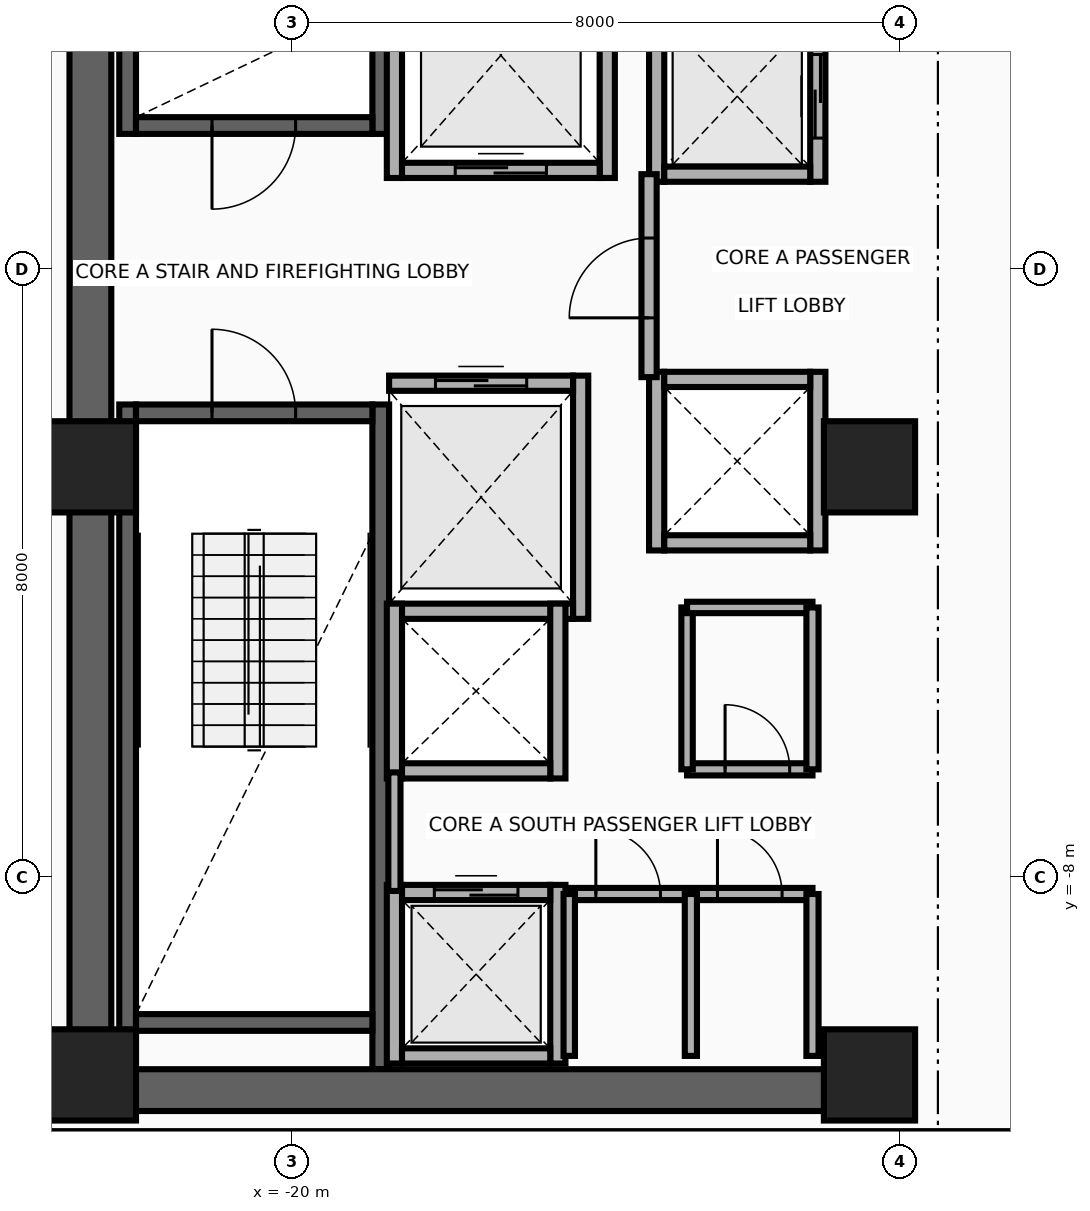
"""IFC4 building model, lengths in metres.
Left out: names, types, materials, properties, quantities, classifications, styles, units other than length and angle.
Written with IfcOpenShell. Run it as: python <this file> out.ifc"""

import sys

from ifc_helpers import new_model, si_unit, direction, frame, frame_2d, origin, origin_2d, place, context, subcontext, project, spatial, rectangle, extrude, source, transform, mapped, element, fill, save


model = new_model("IFC4")
c1 = context("Model", 3, precision=1e-05, world=origin(), true_north=direction((0.0, 1.0)))
c2 = subcontext(c1, "Body", "Model", "MODEL_VIEW")
j1 = project(units=[si_unit("LENGTHUNIT", "METRE"), si_unit("PLANEANGLEUNIT", "RADIAN")], contexts=[c1])
p1 = place(None, origin())
s1 = spatial("IfcSite", under=j1, at=p1, CompositionType="ELEMENT")
p2 = place(p1, origin())
s2 = spatial("IfcBuilding", under=s1, at=p2, CompositionType="ELEMENT")
p3 = place(p2, frame((0.0, 0.0, 153.8)))
s3 = spatial("IfcBuildingStorey", under=s2, at=p3, CompositionType="ELEMENT", Elevation=153.8)
for number, where, z_axis, x_axis in (
    (1, (-22.16, 1.78, 0.0), (0.0, 0.0, 1.0), (0.0, 1.0, 0.0)),
    (2, (-18.83, 1.78, 0.0), (0.0, 0.0, 1.0), (0.0, 1.0, 0.0)),
):
    element("IfcWall", number, at=place(p3, frame(where, z_axis=z_axis, x_axis=x_axis)), inside=s3, PredefinedType="SHEAR", context=c2, shape_type="SweptSolid", body=[
        extrude(rectangle(XDim=8.745, YDim=0.22, at=frame_2d((4.373, 0.0))), origin(), (0.0, 0.0, 1.0), 3.46),
    ])
p4 = place(p3, frame((-22.05, 1.89, 0.0), z_axis=(0.0, 0.0, 1.0), x_axis=(1.0, 0.0, 0.0)))
e3 = element("IfcWall", 3, at=p4, inside=s3, PredefinedType="SHEAR", context=c2, shape_type="SweptSolid", body=[
    extrude(rectangle(XDim=3.11, YDim=0.22, at=frame_2d((1.555, 0.0))), origin(), (0.0, 0.0, 1.0), 3.46),
])
p5 = place(p4, frame((1.0, 0.0, 0.0)))
e4 = element("IfcOpeningElement", 4, at=p5, cuts=e3, PredefinedType="OPENING", context=c2, shape_type="SweptSolid", body=[
    extrude(rectangle(XDim=1.1, YDim=2.15, at=frame_2d((0.55, 1.075))), frame((0.0, 0.125, 0.0), z_axis=(0.0, -1.0, 0.0), x_axis=(1.0, 0.0, 0.0)), (0.0, 0.0, 1.0), 0.25),
])
for number, where, z_axis, x_axis in (
    (5, (-22.16, -10.525, 0.0), (0.0, 0.0, 1.0), (0.0, 1.0, 0.0)),
    (6, (-18.83, -10.525, 0.0), (0.0, 0.0, 1.0), (0.0, 1.0, 0.0)),
):
    element("IfcWall", number, at=place(p3, frame(where, z_axis=z_axis, x_axis=x_axis)), inside=s3, PredefinedType="SHEAR", context=c2, shape_type="SweptSolid", body=[
        extrude(rectangle(XDim=8.745, YDim=0.22, at=frame_2d((4.373, 0.0))), origin(), (0.0, 0.0, 1.0), 3.46),
    ])
p6 = place(p3, frame((-22.05, -9.91, 0.0), z_axis=(0.0, 0.0, 1.0), x_axis=(1.0, 0.0, 0.0)))
e7 = element("IfcWall", 7, at=p6, inside=s3, PredefinedType="SHEAR", context=c2, shape_type="SweptSolid", body=[
    extrude(rectangle(XDim=3.11, YDim=0.22, at=frame_2d((1.555, 0.0))), origin(), (0.0, 0.0, 1.0), 3.46),
])
p7 = place(p3, frame((-22.05, -1.89, 0.0), z_axis=(0.0, 0.0, 1.0), x_axis=(1.0, 0.0, 0.0)))
e8 = element("IfcWall", 8, at=p7, inside=s3, PredefinedType="SHEAR", context=c2, shape_type="SweptSolid", body=[
    extrude(rectangle(XDim=3.11, YDim=0.22, at=frame_2d((1.555, 0.0))), origin(), (0.0, 0.0, 1.0), 3.46),
])
p8 = place(p7, frame((1.0, 0.0, 0.0)))
e9 = element("IfcOpeningElement", 9, at=p8, cuts=e8, PredefinedType="OPENING", context=c2, shape_type="SweptSolid", body=[
    extrude(rectangle(XDim=1.1, YDim=2.15, at=frame_2d((0.55, 1.075))), frame((0.0, 0.125, 0.0), z_axis=(0.0, -1.0, 0.0), x_axis=(1.0, 0.0, 0.0)), (0.0, 0.0, 1.0), 0.25),
])
p9 = place(p3, frame((-22.65, -11.075, 0.0), z_axis=(0.0, 0.0, 1.0), x_axis=(0.0, 1.0, 0.0)))
e10 = element("IfcWall", 10, at=p9, inside=s3, PredefinedType="SHEAR", context=c2, shape_type="SweptSolid", body=[
    extrude(rectangle(XDim=22.15, YDim=0.55, at=frame_2d((11.075, 0.0))), origin(), (0.0, 0.0, 1.0), 3.46),
])
p10 = place(p3, frame((-22.65, -10.8, 0.0), z_axis=(0.0, 0.0, 1.0), x_axis=(1.0, 0.0, 0.0)))
e11 = element("IfcWall", 11, at=p10, inside=s3, PredefinedType="SHEAR", context=c2, shape_type="SweptSolid", body=[
    extrude(rectangle(XDim=10.25, YDim=0.55, at=frame_2d((5.125, 0.0))), origin(), (0.0, 0.0, 1.0), 3.46),
])
m1 = source(origin(), c2, "Body", "SweptSolid", [
    extrude(rectangle(XDim=1.2, YDim=1.2, at=origin_2d()), origin(), (0.0, 0.0, 1.0), 3.7),
])
for number, where, z_axis, x_axis in (
    (12, (-22.65, -10.6, 0.0), (0.0, 0.0, 1.0), (1.0, 0.0, 0.0)),
    (13, (-12.4, -10.6, 0.0), (0.0, 0.0, 1.0), (1.0, 0.0, 0.0)),
    (14, (-22.65, -2.6, 0.0), (0.0, 0.0, 1.0), (1.0, 0.0, 0.0)),
    (15, (-12.4, -2.6, 0.0), (0.0, 0.0, 1.0), (1.0, 0.0, 0.0)),
):
    element("IfcColumn", number, at=place(p3, frame(where, z_axis=z_axis, x_axis=x_axis)), inside=s3, PredefinedType="COLUMN", context=c2, shape_type="MappedRepresentation", body=[
        mapped(m1, transform((0.0, 0.0, 0.0), x_axis=(1.0, 0.0, 0.0), y_axis=(0.0, 1.0, 0.0), z_axis=(0.0, 0.0, 1.0), scale=1.0)),
    ])
for number, where, z_axis, x_axis in (
    (16, (-18.65, 1.2, 0.0), (0.0, 0.0, 1.0), (0.0, 1.0, 0.0)),
    (17, (-15.85, 1.2, 0.0), (0.0, 0.0, 1.0), (0.0, 1.0, 0.0)),
):
    element("IfcWall", number, at=place(p3, frame(where, z_axis=z_axis, x_axis=x_axis)), inside=s3, PredefinedType="MOVABLE", context=c2, shape_type="SweptSolid", body=[
        extrude(rectangle(XDim=3.225, YDim=0.2, at=frame_2d((1.613, 0.0))), origin(), (0.0, 0.0, 1.0), 3.46),
    ])
p11 = place(p3, frame((-18.55, 1.3, 0.0), z_axis=(0.0, 0.0, 1.0), x_axis=(1.0, 0.0, 0.0)))
e18 = element("IfcWall", 18, at=p11, inside=s3, PredefinedType="MOVABLE", context=c2, shape_type="SweptSolid", body=[
    extrude(rectangle(XDim=2.6, YDim=0.2, at=frame_2d((1.3, 0.0))), origin(), (0.0, 0.0, 1.0), 3.46),
])
p12 = place(p11, frame((0.7, 0.0, 0.0)))
e19 = element("IfcOpeningElement", 19, at=p12, cuts=e18, PredefinedType="OPENING", context=c2, shape_type="SweptSolid", body=[
    extrude(rectangle(XDim=1.2, YDim=2.1, at=frame_2d((0.6, 1.05))), frame((0.0, 0.115, 0.0), z_axis=(0.0, -1.0, 0.0), x_axis=(1.0, 0.0, 0.0)), (0.0, 0.0, 1.0), 0.23),
])
p13 = place(p3, frame((-16.2, -4.6, 0.0), z_axis=(0.0, 0.0, 1.0), x_axis=(0.0, 1.0, 0.0)))
e20 = element("IfcWall", 20, at=p13, inside=s3, PredefinedType="MOVABLE", context=c2, shape_type="SweptSolid", body=[
    extrude(rectangle(XDim=3.2, YDim=0.2, at=frame_2d((1.6, 0.0))), origin(), (0.0, 0.0, 1.0), 3.46),
])
p14 = place(p3, frame((-18.72, -4.5, 0.0), z_axis=(0.0, 0.0, 1.0), x_axis=(1.0, 0.0, 0.0)))
e21 = element("IfcWall", 21, at=p14, inside=s3, PredefinedType="MOVABLE", context=c2, shape_type="SweptSolid", body=[
    extrude(rectangle(XDim=2.42, YDim=0.2, at=frame_2d((1.21, 0.0))), origin(), (0.0, 0.0, 1.0), 3.46),
])
p15 = place(p3, frame((-18.72, -1.5, 0.0), z_axis=(0.0, 0.0, 1.0), x_axis=(1.0, 0.0, 0.0)))
e22 = element("IfcWall", 22, at=p15, inside=s3, PredefinedType="MOVABLE", context=c2, shape_type="SweptSolid", body=[
    extrude(rectangle(XDim=2.42, YDim=0.2, at=frame_2d((1.21, 0.0))), origin(), (0.0, 0.0, 1.0), 3.46),
])
p16 = place(p15, frame((0.61, 0.0, 0.0)))
e23 = element("IfcOpeningElement", 23, at=p16, cuts=e22, PredefinedType="OPENING", context=c2, shape_type="SweptSolid", body=[
    extrude(rectangle(XDim=1.2, YDim=2.1, at=frame_2d((0.6, 1.05))), frame((0.0, 0.115, 0.0), z_axis=(0.0, -1.0, 0.0), x_axis=(1.0, 0.0, 0.0)), (0.0, 0.0, 1.0), 0.23),
])
for number, where, z_axis, x_axis in (
    (24, (-18.65, -10.45, 0.0), (0.0, 0.0, 1.0), (0.0, 1.0, 0.0)),
    (25, (-16.5, -10.45, 0.0), (0.0, 0.0, 1.0), (0.0, 1.0, 0.0)),
):
    element("IfcWall", number, at=place(p3, frame(where, z_axis=z_axis, x_axis=x_axis)), inside=s3, PredefinedType="MOVABLE", context=c2, shape_type="SweptSolid", body=[
        extrude(rectangle(XDim=2.35, YDim=0.2, at=frame_2d((1.175, 0.0))), origin(), (0.0, 0.0, 1.0), 2.666),
    ])
p17 = place(p3, frame((-18.55, -10.35, 0.0), z_axis=(0.0, 0.0, 1.0), x_axis=(1.0, 0.0, 0.0)))
e26 = element("IfcWall", 26, at=p17, inside=s3, PredefinedType="MOVABLE", context=c2, shape_type="SweptSolid", body=[
    extrude(rectangle(XDim=1.95, YDim=0.2, at=frame_2d((0.975, 0.0))), origin(), (0.0, 0.0, 1.0), 2.666),
])
p18 = place(p3, frame((-18.55, -8.2, 0.0), z_axis=(0.0, 0.0, 1.0), x_axis=(1.0, 0.0, 0.0)))
e27 = element("IfcWall", 27, at=p18, inside=s3, PredefinedType="MOVABLE", context=c2, shape_type="SweptSolid", body=[
    extrude(rectangle(XDim=1.95, YDim=0.2, at=frame_2d((0.975, 0.0))), origin(), (0.0, 0.0, 1.0), 3.46),
])
p19 = place(p18, frame((0.425, 0.0, 0.0)))
e28 = element("IfcOpeningElement", 28, at=p19, cuts=e27, PredefinedType="OPENING", context=c2, shape_type="SweptSolid", body=[
    extrude(rectangle(XDim=1.1, YDim=2.1, at=frame_2d((0.55, 1.05))), frame((0.0, 0.115, 0.0), z_axis=(0.0, -1.0, 0.0), x_axis=(1.0, 0.0, 0.0)), (0.0, 0.0, 1.0), 0.23),
])
p20 = place(p3, frame((-15.2, 1.15, 0.0), z_axis=(0.0, 0.0, 1.0), x_axis=(0.0, 1.0, 0.0)))
e29 = element("IfcWall", 29, at=p20, inside=s3, PredefinedType="MOVABLE", context=c2, shape_type="SweptSolid", body=[
    extrude(rectangle(XDim=2.25, YDim=0.2, at=frame_2d((1.125, 0.0))), origin(), (0.0, 0.0, 1.0), 3.46),
])
p21 = place(p3, frame((-13.08, 1.15, 0.0), z_axis=(0.0, 0.0, 1.0), x_axis=(0.0, 1.0, 0.0)))
e30 = element("IfcWall", 30, at=p21, inside=s3, PredefinedType="MOVABLE", context=c2, shape_type="SweptSolid", body=[
    extrude(rectangle(XDim=2.25, YDim=0.2, at=frame_2d((1.125, 0.0))), origin(), (0.0, 0.0, 1.0), 3.46),
])
p22 = place(p21, frame((0.575, 0.0, 0.0)))
e31 = element("IfcOpeningElement", 31, at=p22, cuts=e30, PredefinedType="OPENING", context=c2, shape_type="SweptSolid", body=[
    extrude(rectangle(XDim=1.1, YDim=2.1, at=frame_2d((0.55, 1.05))), frame((0.0, 0.115, 0.0), z_axis=(0.0, -1.0, 0.0), x_axis=(1.0, 0.0, 0.0)), (0.0, 0.0, 1.0), 0.23),
])
p23 = place(p3, frame((-15.1, 1.25, 0.0), z_axis=(0.0, 0.0, 1.0), x_axis=(1.0, 0.0, 0.0)))
e32 = element("IfcWall", 32, at=p23, inside=s3, PredefinedType="MOVABLE", context=c2, shape_type="SweptSolid", body=[
    extrude(rectangle(XDim=1.92, YDim=0.2, at=frame_2d((0.96, 0.0))), origin(), (0.0, 0.0, 1.0), 3.46),
])
for number, where, z_axis, x_axis in (
    (33, (-18.65, -6.7, 0.0), (0.0, 0.0, 1.0), (0.0, 1.0, 0.0)),
    (34, (-16.5, -6.7, 0.0), (0.0, 0.0, 1.0), (0.0, 1.0, 0.0)),
):
    element("IfcWall", number, at=place(p3, frame(where, z_axis=z_axis, x_axis=x_axis)), inside=s3, PredefinedType="MOVABLE", context=c2, shape_type="SweptSolid", body=[
        extrude(rectangle(XDim=2.3, YDim=0.2, at=frame_2d((1.15, 0.0))), origin(), (0.0, 0.0, 1.0), 3.46),
    ])
p24 = place(p3, frame((-18.55, -6.6, 0.0), z_axis=(0.0, 0.0, 1.0), x_axis=(1.0, 0.0, 0.0)))
e35 = element("IfcWall", 35, at=p24, inside=s3, PredefinedType="MOVABLE", context=c2, shape_type="SweptSolid", body=[
    extrude(rectangle(XDim=1.95, YDim=0.2, at=frame_2d((0.975, 0.0))), origin(), (0.0, 0.0, 1.0), 3.46),
])
for number, where, z_axis, x_axis in (
    (36, (-15.2, -3.7, 0.0), (0.0, 0.0, 1.0), (0.0, 1.0, 0.0)),
    (37, (-13.08, -3.7, 0.0), (0.0, 0.0, 1.0), (0.0, 1.0, 0.0)),
):
    element("IfcWall", number, at=place(p3, frame(where, z_axis=z_axis, x_axis=x_axis)), inside=s3, PredefinedType="MOVABLE", context=c2, shape_type="SweptSolid", body=[
        extrude(rectangle(XDim=2.35, YDim=0.2, at=frame_2d((1.175, 0.0))), origin(), (0.0, 0.0, 1.0), 3.46),
    ])
for number, where, z_axis, x_axis in (
    (38, (-15.1, -3.6, 0.0), (0.0, 0.0, 1.0), (1.0, 0.0, 0.0)),
    (39, (-15.1, -1.45, 0.0), (0.0, 0.0, 1.0), (1.0, 0.0, 0.0)),
):
    element("IfcWall", number, at=place(p3, frame(where, z_axis=z_axis, x_axis=x_axis)), inside=s3, PredefinedType="MOVABLE", context=c2, shape_type="SweptSolid", body=[
        extrude(rectangle(XDim=1.92, YDim=0.2, at=frame_2d((0.96, 0.0))), origin(), (0.0, 0.0, 1.0), 3.46),
    ])
p25 = place(p3, frame((-15.3, -1.42, 0.0), z_axis=(0.0, 0.0, 1.0), x_axis=(0.0, 1.0, 0.0)))
e40 = element("IfcWall", 40, at=p25, inside=s3, PredefinedType="PARTITIONING", context=c2, shape_type="SweptSolid", body=[
    extrude(rectangle(XDim=2.67, YDim=0.2, at=frame_2d((1.335, 0.0))), origin(), (0.0, 0.0, 1.0), 3.46),
])
p26 = place(p25, frame((0.78, 0.0, 0.0)))
e41 = element("IfcOpeningElement", 41, at=p26, cuts=e40, PredefinedType="OPENING", context=c2, shape_type="SweptSolid", body=[
    extrude(rectangle(XDim=1.05, YDim=2.15, at=frame_2d((0.525, 1.075))), frame((0.0, 0.115, 0.0), z_axis=(0.0, -1.0, 0.0), x_axis=(1.0, 0.0, 0.0)), (0.0, 0.0, 1.0), 0.23),
])
p27 = place(p3, frame((-18.65, -8.18, 0.0), z_axis=(0.0, 0.0, 1.0), x_axis=(0.0, 1.0, 0.0)))
e42 = element("IfcWall", 42, at=p27, inside=s3, PredefinedType="PARTITIONING", context=c2, shape_type="SweptSolid", body=[
    extrude(rectangle(XDim=1.56, YDim=0.16, at=frame_2d((0.78, 0.0))), origin(), (0.0, 0.0, 1.0), 3.46),
])
p28 = place(p3, frame((-16.35, -8.22, 0.0), z_axis=(0.0, 0.0, 1.0), x_axis=(1.0, 0.0, 0.0)))
e43 = element("IfcWall", 43, at=p28, inside=s3, PredefinedType="PARTITIONING", context=c2, shape_type="SweptSolid", body=[
    extrude(rectangle(XDim=3.2, YDim=0.16, at=frame_2d((1.6, 0.0))), origin(), (0.0, 0.0, 1.0), 3.46),
])
p29 = place(p28, frame((0.35, 0.0, 0.0)))
e44 = element("IfcOpeningElement", 44, at=p29, cuts=e43, PredefinedType="OPENING", context=c2, shape_type="SweptSolid", body=[
    extrude(rectangle(XDim=0.85, YDim=2.05, at=frame_2d((0.425, 1.025))), frame((0.0, 0.095, 0.0), z_axis=(0.0, -1.0, 0.0), x_axis=(1.0, 0.0, 0.0)), (0.0, 0.0, 1.0), 0.19),
])
p30 = place(p28, frame((1.95, 0.0, 0.0)))
e45 = element("IfcOpeningElement", 45, at=p30, cuts=e43, PredefinedType="OPENING", context=c2, shape_type="SweptSolid", body=[
    extrude(rectangle(XDim=0.85, YDim=2.05, at=frame_2d((0.425, 1.025))), frame((0.0, 0.095, 0.0), z_axis=(0.0, -1.0, 0.0), x_axis=(1.0, 0.0, 0.0)), (0.0, 0.0, 1.0), 0.19),
])
p31 = place(p3, frame((-16.35, -10.35, 0.0), z_axis=(0.0, 0.0, 1.0), x_axis=(0.0, 1.0, 0.0)))
e46 = element("IfcWall", 46, at=p31, inside=s3, PredefinedType="PARTITIONING", context=c2, shape_type="SweptSolid", body=[
    extrude(rectangle(XDim=2.13, YDim=0.15, at=frame_2d((1.065, 0.0))), origin(), (0.0, 0.0, 1.0), 3.46),
])
for number, where, z_axis, x_axis in (
    (47, (-13.15, -10.35, 0.0), (0.0, 0.0, 1.0), (0.0, 1.0, 0.0)),
    (48, (-14.75, -10.35, 0.0), (0.0, 0.0, 1.0), (0.0, 1.0, 0.0)),
):
    element("IfcWall", number, at=place(p3, frame(where, z_axis=z_axis, x_axis=x_axis)), inside=s3, PredefinedType="PARTITIONING", context=c2, shape_type="SweptSolid", body=[
        extrude(rectangle(XDim=2.13, YDim=0.16, at=frame_2d((1.065, 0.0))), origin(), (0.0, 0.0, 1.0), 3.46),
    ])
p32 = place(p3, frame((-14.8, -6.58, 0.0), z_axis=(0.0, 0.0, 1.0), x_axis=(1.0, 0.0, 0.0)))
e49 = element("IfcWall", 49, at=p32, inside=s3, PredefinedType="PARTITIONING", context=c2, shape_type="SweptSolid", body=[
    extrude(rectangle(XDim=1.65, YDim=0.16, at=frame_2d((0.825, 0.0))), origin(), (0.0, 0.0, 1.0), 3.46),
])
p33 = place(p32, frame((0.5, 0.0, 0.0)))
e50 = element("IfcOpeningElement", 50, at=p33, cuts=e49, PredefinedType="OPENING", context=c2, shape_type="SweptSolid", body=[
    extrude(rectangle(XDim=0.85, YDim=2.05, at=frame_2d((0.425, 1.025))), frame((0.0, 0.095, 0.0), z_axis=(0.0, -1.0, 0.0), x_axis=(1.0, 0.0, 0.0)), (0.0, 0.0, 1.0), 0.19),
])
p34 = place(p3, frame((-14.8, -6.58, 0.0), z_axis=(0.0, 0.0, 1.0), x_axis=(0.0, 1.0, 0.0)))
e51 = element("IfcWall", 51, at=p34, inside=s3, PredefinedType="PARTITIONING", context=c2, shape_type="SweptSolid", body=[
    extrude(rectangle(XDim=2.13, YDim=0.15, at=frame_2d((1.065, 0.0))), origin(), (0.0, 0.0, 1.0), 3.46),
])
p35 = place(p3, frame((-14.8, -4.45, 0.0), z_axis=(0.0, 0.0, 1.0), x_axis=(1.0, 0.0, 0.0)))
e52 = element("IfcWall", 52, at=p35, inside=s3, PredefinedType="PARTITIONING", context=c2, shape_type="SweptSolid", body=[
    extrude(rectangle(XDim=1.65, YDim=0.15, at=frame_2d((0.825, 0.0))), origin(), (0.0, 0.0, 1.0), 3.46),
])
p36 = place(p3, frame((-13.15, -6.58, 0.0), z_axis=(0.0, 0.0, 1.0), x_axis=(0.0, 1.0, 0.0)))
e53 = element("IfcWall", 53, at=p36, inside=s3, PredefinedType="PARTITIONING", context=c2, shape_type="SweptSolid", body=[
    extrude(rectangle(XDim=2.13, YDim=0.16, at=frame_2d((1.065, 0.0))), origin(), (0.0, 0.0, 1.0), 3.46),
])
p37 = place(p3, frame((-23.45, -11.42, 0.0), z_axis=(0.0, 0.0, 1.0), x_axis=(1.0, 0.0, 0.0)))
e54 = element("IfcWall", 54, at=p37, inside=s3, PredefinedType="PARTITIONING", context=c2, shape_type="SweptSolid", body=[
    extrude(rectangle(XDim=13.84, YDim=0.16, at=frame_2d((6.92, 0.0))), origin(), (0.0, 0.0, 1.0), 2.834),
])
p38 = place(p12, origin())
e55 = element("IfcDoor", 55, at=p38, inside=s3, OperationType="DOUBLE_DOOR_SLIDING", PredefinedType="DOOR", context=c2, shape_type="SweptSolid", body=[
    extrude(rectangle(XDim=1.2, YDim=2.1, at=frame_2d((0.6, 1.05))), frame((0.0, 0.025, 0.0), z_axis=(0.0, -1.0, 0.0), x_axis=(1.0, 0.0, 0.0)), (0.0, 0.0, 1.0), 0.05),
])
fill(e19, e55)
p39 = place(p16, origin())
e56 = element("IfcDoor", 56, at=p39, inside=s3, OperationType="DOUBLE_DOOR_SLIDING", PredefinedType="DOOR", context=c2, shape_type="SweptSolid", body=[
    extrude(rectangle(XDim=1.2, YDim=2.1, at=frame_2d((0.6, 1.05))), frame((0.0, 0.025, 0.0), z_axis=(0.0, -1.0, 0.0), x_axis=(1.0, 0.0, 0.0)), (0.0, 0.0, 1.0), 0.05),
])
fill(e23, e56)
p40 = place(p19, origin())
e57 = element("IfcDoor", 57, at=p40, inside=s3, OperationType="DOUBLE_DOOR_SLIDING", PredefinedType="DOOR", context=c2, shape_type="SweptSolid", body=[
    extrude(rectangle(XDim=1.1, YDim=2.1, at=frame_2d((0.55, 1.05))), frame((0.0, 0.025, 0.0), z_axis=(0.0, -1.0, 0.0), x_axis=(1.0, 0.0, 0.0)), (0.0, 0.0, 1.0), 0.05),
])
fill(e28, e57)
p41 = place(p22, origin())
e58 = element("IfcDoor", 58, at=p41, inside=s3, OperationType="DOUBLE_DOOR_SLIDING", PredefinedType="DOOR", context=c2, shape_type="SweptSolid", body=[
    extrude(rectangle(XDim=1.1, YDim=2.1, at=frame_2d((0.55, 1.05))), frame((0.0, 0.025, 0.0), z_axis=(0.0, -1.0, 0.0), x_axis=(1.0, 0.0, 0.0)), (0.0, 0.0, 1.0), 0.05),
])
fill(e31, e58)
p42 = place(p26, origin())
e59 = element("IfcDoor", 59, at=p42, inside=s3, OperationType="SINGLE_SWING_RIGHT", PredefinedType="DOOR", context=c2, shape_type="SweptSolid", body=[
    extrude(rectangle(XDim=1.05, YDim=2.15, at=frame_2d((0.525, 1.075))), frame((0.0, 0.025, 0.0), z_axis=(0.0, -1.0, 0.0), x_axis=(1.0, 0.0, 0.0)), (0.0, 0.0, 1.0), 0.05),
])
fill(e41, e59)
p43 = place(p5, frame((1.1, 0.0, 0.0), z_axis=(0.0, 0.0, 1.0), x_axis=(-1.0, 0.0, 0.0)))
e60 = element("IfcDoor", 60, at=p43, inside=s3, OperationType="SINGLE_SWING_LEFT", PredefinedType="DOOR", context=c2, shape_type="SweptSolid", body=[
    extrude(rectangle(XDim=1.1, YDim=2.15, at=frame_2d((0.55, 1.075))), frame((0.0, 0.025, 0.0), z_axis=(0.0, -1.0, 0.0), x_axis=(1.0, 0.0, 0.0)), (0.0, 0.0, 1.0), 0.05),
])
fill(e4, e60)
p44 = place(p8, origin())
e61 = element("IfcDoor", 61, at=p44, inside=s3, OperationType="SINGLE_SWING_RIGHT", PredefinedType="DOOR", context=c2, shape_type="SweptSolid", body=[
    extrude(rectangle(XDim=1.1, YDim=2.15, at=frame_2d((0.55, 1.075))), frame((0.0, 0.025, 0.0), z_axis=(0.0, -1.0, 0.0), x_axis=(1.0, 0.0, 0.0)), (0.0, 0.0, 1.0), 0.05),
])
fill(e9, e61)
p45 = place(p29, origin())
e62 = element("IfcDoor", 62, at=p45, inside=s3, OperationType="SINGLE_SWING_LEFT", PredefinedType="DOOR", context=c2, shape_type="SweptSolid", body=[
    extrude(rectangle(XDim=0.85, YDim=2.05, at=frame_2d((0.425, 1.025))), frame((0.0, 0.025, 0.0), z_axis=(0.0, -1.0, 0.0), x_axis=(1.0, 0.0, 0.0)), (0.0, 0.0, 1.0), 0.05),
])
fill(e44, e62)
p46 = place(p30, origin())
e63 = element("IfcDoor", 63, at=p46, inside=s3, OperationType="SINGLE_SWING_RIGHT", PredefinedType="DOOR", context=c2, shape_type="SweptSolid", body=[
    extrude(rectangle(XDim=0.85, YDim=2.05, at=frame_2d((0.425, 1.025))), frame((0.0, 0.025, 0.0), z_axis=(0.0, -1.0, 0.0), x_axis=(1.0, 0.0, 0.0)), (0.0, 0.0, 1.0), 0.05),
])
fill(e45, e63)
p47 = place(p33, origin())
e64 = element("IfcDoor", 64, at=p47, inside=s3, OperationType="SINGLE_SWING_LEFT", PredefinedType="DOOR", context=c2, shape_type="SweptSolid", body=[
    extrude(rectangle(XDim=0.85, YDim=2.05, at=frame_2d((0.425, 1.025))), frame((0.0, 0.025, 0.0), z_axis=(0.0, -1.0, 0.0), x_axis=(1.0, 0.0, 0.0)), (0.0, 0.0, 1.0), 0.05),
])
fill(e50, e64)
save(model, sys.argv[1])
